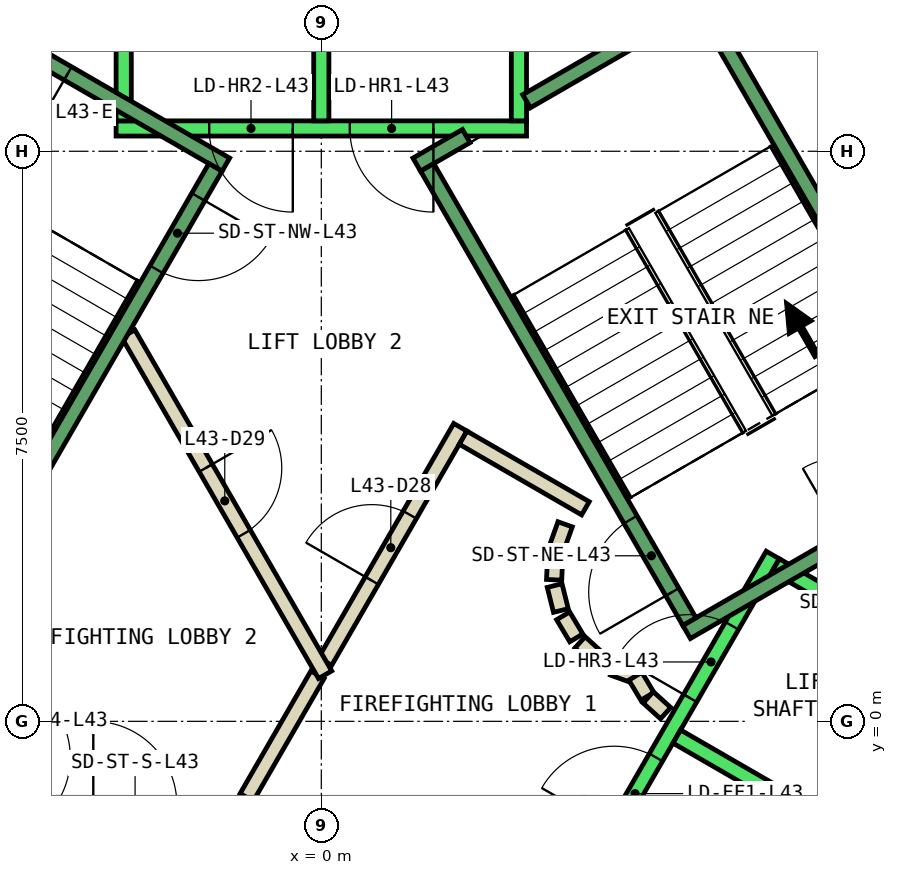
"""IFC4 building model, lengths in metres.
Left out: names, types, materials, properties, quantities, classifications, styles, units other than length and angle.
Written with IfcOpenShell. Run it as: python <this file> out.ifc"""

import sys

from ifc_helpers import new_model, si_unit, direction, frame, frame_2d, origin, place, context, subcontext, project, spatial, polyline, rectangle, outline, extrude, element, fill, save


model = new_model("IFC4")
c1 = context("Model", 3, precision=1e-05, world=origin(), true_north=direction((0.0, 1.0)))
c2 = subcontext(c1, "Body", "Model", "MODEL_VIEW")
j1 = project(units=[si_unit("LENGTHUNIT", "METRE"), si_unit("PLANEANGLEUNIT", "RADIAN")], contexts=[c1])
p1 = place(None, origin())
s1 = spatial("IfcSite", under=j1, at=p1, CompositionType="ELEMENT")
p2 = place(p1, origin())
s2 = spatial("IfcBuilding", under=s1, at=p2, CompositionType="ELEMENT")
p3 = place(p2, frame((0.0, 0.0, 194.0)))
s3 = spatial("IfcBuildingStorey", under=s2, at=p3, CompositionType="ELEMENT", Elevation=194.0)
p4 = place(p3, frame((0.0, 0.0, -0.4)))
e1 = element("IfcWall", 1, at=p4, inside=s3, PredefinedType="SHEAR", context=c2, shape_type="SweptSolid", body=[
    extrude(outline(polyline([(6.64, -9.0), (13.279, 2.5), (12.471, 2.5), (6.235, -8.3), (6.64, -9.0)])), origin(), (0.0, 0.0, 1.0), 4.2),
])
p5 = place(p3, frame((-0.982, -1.0, 0.0), z_axis=(0.0, 0.0, 1.0), x_axis=(0.50024047865, 0.865886518847, 0.0)))
e2 = element("IfcWall", 2, at=p5, inside=s3, PredefinedType="PARTITIONING", context=c2, shape_type="SweptSolid", body=[
    extrude(rectangle(XDim=1.863, YDim=0.2, at=frame_2d((0.931, 0.0))), origin(), (0.0, 0.0, 1.0), 3.8),
])
p6 = place(p3, frame((0.05, 0.787, 0.0), z_axis=(0.0, 0.0, 1.0), x_axis=(0.499954076797, 0.866051915934, 0.0)))
e3 = element("IfcWall", 3, at=p6, inside=s3, PredefinedType="PARTITIONING", context=c2, shape_type="SweptSolid", body=[
    extrude(rectangle(XDim=3.558, YDim=0.2, at=frame_2d((1.779, 0.0))), origin(), (0.0, 0.0, 1.0), 3.8),
])
p7 = place(p6, frame((1.229, 0.0, 0.0)))
e4 = element("IfcOpeningElement", 4, at=p7, cuts=e3, PredefinedType="OPENING", context=c2, shape_type="SweptSolid", body=[
    extrude(rectangle(XDim=1.0, YDim=2.1, at=frame_2d((0.5, 1.05))), frame((0.0, 0.11, 0.0), z_axis=(0.0, -1.0, 0.0), x_axis=(1.0, 0.0, 0.0)), (0.0, 0.0, 1.0), 0.22),
])
p8 = place(p3, frame((1.866, 3.732, 0.0), z_axis=(0.0, 0.0, 1.0), x_axis=(0.866043361281, -0.499968895414, 0.0)))
e5 = element("IfcWall", 5, at=p8, inside=s3, PredefinedType="PARTITIONING", context=c2, shape_type="SweptSolid", body=[
    extrude(rectangle(XDim=1.858, YDim=0.2, at=frame_2d((0.929, 0.0))), origin(), (0.0, 0.0, 1.0), 3.8),
])
p9 = place(p3, frame((3.208, 2.592, 0.0), z_axis=(0.0, 0.0, 1.0), x_axis=(-0.337388820924, -0.941365382578, 0.0)))
e6 = element("IfcWall", 6, at=p9, inside=s3, PredefinedType="PARTITIONING", context=c2, shape_type="SweptSolid", body=[
    extrude(rectangle(XDim=0.338, YDim=0.2, at=frame_2d((0.169, 0.0))), origin(), (0.0, 0.0, 1.0), 3.8),
])
p10 = place(p3, frame((3.079, 2.199, 0.0), z_axis=(0.0, 0.0, 1.0), x_axis=(-0.047771483479, -0.998858290933, 0.0)))
e7 = element("IfcWall", 7, at=p10, inside=s3, PredefinedType="PARTITIONING", context=c2, shape_type="SweptSolid", body=[
    extrude(rectangle(XDim=0.337, YDim=0.2, at=frame_2d((0.169, 0.0))), origin(), (0.0, 0.0, 1.0), 3.8),
])
p11 = place(p3, frame((3.07, 1.786, 0.0), z_axis=(0.0, 0.0, 1.0), x_axis=(0.242705583207, -0.970099994784, 0.0)))
e8 = element("IfcWall", 8, at=p11, inside=s3, PredefinedType="PARTITIONING", context=c2, shape_type="SweptSolid", body=[
    extrude(rectangle(XDim=0.338, YDim=0.2, at=frame_2d((0.169, 0.0))), origin(), (0.0, 0.0, 1.0), 3.8),
])
for number, where, z_axis, x_axis in (
    (9, (3.182, 1.388, 0.0), (0.0, 0.0, 1.0), (0.512, -0.859, 0.0)),
    (10, (3.404, 1.039, 0.0), (0.0, 0.0, 1.0), (0.74, -0.672, 0.0)),
):
    element("IfcWall", number, at=place(p3, frame(where, z_axis=z_axis, x_axis=x_axis)), inside=s3, PredefinedType="PARTITIONING", context=c2, shape_type="SweptSolid", body=[
        extrude(rectangle(XDim=0.338, YDim=0.2, at=frame_2d((0.169, 0.0))), origin(), (0.0, 0.0, 1.0), 3.8),
    ])
p12 = place(p3, frame((3.838, 0.702, 0.0), z_axis=(0.0, 0.0, 1.0), x_axis=(0.941035081519, -0.338308993895, 0.0)))
e11 = element("IfcWall", 11, at=p12, inside=s3, PredefinedType="PARTITIONING", context=c2, shape_type="SweptSolid", body=[
    extrude(rectangle(XDim=0.337, YDim=0.2, at=frame_2d((0.168, 0.0))), origin(), (0.0, 0.0, 1.0), 3.8),
])
p13 = place(p3, frame((4.132, 0.593, 0.0), z_axis=(0.0, 0.0, 1.0), x_axis=(0.513561617048, -0.858052717201, 0.0)))
e12 = element("IfcWall", 12, at=p13, inside=s3, PredefinedType="PARTITIONING", context=c2, shape_type="SweptSolid", body=[
    extrude(rectangle(XDim=0.308, YDim=0.2, at=frame_2d((0.154, 0.0))), origin(), (0.0, 0.0, 1.0), 3.8),
])
p14 = place(p3, frame((4.301, 0.315, 0.0), z_axis=(0.0, 0.0, 1.0), x_axis=(0.741798017506, -0.670623367639, 0.0)))
e13 = element("IfcWall", 13, at=p14, inside=s3, PredefinedType="PARTITIONING", context=c2, shape_type="SweptSolid", body=[
    extrude(rectangle(XDim=0.309, YDim=0.2, at=frame_2d((0.154, 0.0))), origin(), (0.0, 0.0, 1.0), 3.8),
])
p15 = place(p3, frame((-2.54, 5.1, 0.0), z_axis=(0.0, 0.0, 1.0), x_axis=(0.499925051871, -0.866068670783, 0.0)))
e14 = element("IfcWall", 14, at=p15, inside=s3, PredefinedType="PARTITIONING", context=c2, shape_type="SweptSolid", body=[
    extrude(rectangle(XDim=5.181, YDim=0.2, at=frame_2d((2.59, 0.0))), origin(), (0.0, 0.0, 1.0), 3.8),
])
p16 = place(p15, frame((2.04, 0.0, 0.0)))
e15 = element("IfcOpeningElement", 15, at=p16, cuts=e14, PredefinedType="OPENING", context=c2, shape_type="SweptSolid", body=[
    extrude(rectangle(XDim=1.0, YDim=2.1, at=frame_2d((0.5, 1.05))), frame((0.0, 0.11, 0.0), z_axis=(0.0, -1.0, 0.0), x_axis=(1.0, 0.0, 0.0)), (0.0, 0.0, 1.0), 0.22),
])
p17 = place(p3, frame((2.7, 7.8, 0.0), z_axis=(0.0, 0.0, 1.0), x_axis=(-1.0, 0.0, 0.0)))
e16 = element("IfcWall", 16, at=p17, inside=s3, PredefinedType="STANDARD", context=c2, shape_type="SweptSolid", body=[
    extrude(rectangle(XDim=5.4, YDim=0.2, at=frame_2d((2.7, 0.0))), origin(), (0.0, 0.0, 1.0), 3.8),
])
p18 = place(p17, frame((1.225, 0.0, 0.0)))
e17 = element("IfcOpeningElement", 17, at=p18, cuts=e16, PredefinedType="OPENING", context=c2, shape_type="SweptSolid", body=[
    extrude(rectangle(XDim=1.1, YDim=2.1, at=frame_2d((0.55, 1.05))), frame((0.0, 0.11, 0.0), z_axis=(0.0, -1.0, 0.0), x_axis=(1.0, 0.0, 0.0)), (0.0, 0.0, 1.0), 0.22),
])
p19 = place(p17, frame((3.075, 0.0, 0.0)))
e18 = element("IfcOpeningElement", 18, at=p19, cuts=e16, PredefinedType="OPENING", context=c2, shape_type="SweptSolid", body=[
    extrude(rectangle(XDim=1.1, YDim=2.1, at=frame_2d((0.55, 1.05))), frame((0.0, 0.11, 0.0), z_axis=(0.0, -1.0, 0.0), x_axis=(1.0, 0.0, 0.0)), (0.0, 0.0, 1.0), 0.22),
])
for number, where, z_axis, x_axis in (
    (19, (2.6, 7.9, 0.0), (0.0, 0.0, 1.0), (0.0, 1.0, 0.0)),
    (20, (0.0, 7.9, 0.0), (0.0, 0.0, 1.0), (0.0, 1.0, 0.0)),
    (21, (-2.6, 7.9, 0.0), (0.0, 0.0, 1.0), (0.0, 1.0, 0.0)),
):
    element("IfcWall", number, at=place(p3, frame(where, z_axis=z_axis, x_axis=x_axis)), inside=s3, PredefinedType="STANDARD", context=c2, shape_type="SweptSolid", body=[
        extrude(rectangle(XDim=2.4, YDim=0.2, at=frame_2d((1.2, 0.0))), origin(), (0.0, 0.0, 1.0), 3.8),
    ])
p20 = place(p3, frame((-5.94, 2.188, 0.0), z_axis=(0.0, 0.0, 1.0), x_axis=(0.500034260056, -0.866005622828, 0.0)))
e22 = element("IfcWall", 22, at=p20, inside=s3, PredefinedType="STANDARD", context=c2, shape_type="SweptSolid", body=[
    extrude(rectangle(XDim=5.399, YDim=0.2, at=frame_2d((2.7, 0.0))), origin(), (0.0, 0.0, 1.0), 3.8),
])
p21 = place(p20, frame((3.075, 0.0, 0.0)))
e23 = element("IfcOpeningElement", 23, at=p21, cuts=e22, PredefinedType="OPENING", context=c2, shape_type="SweptSolid", body=[
    extrude(rectangle(XDim=1.1, YDim=2.1, at=frame_2d((0.55, 1.05))), frame((0.0, 0.11, 0.0), z_axis=(0.0, -1.0, 0.0), x_axis=(1.0, 0.0, 0.0)), (0.0, 0.0, 1.0), 0.22),
])
p22 = place(p20, frame((1.225, 0.0, 0.0)))
e24 = element("IfcOpeningElement", 24, at=p22, cuts=e22, PredefinedType="OPENING", context=c2, shape_type="SweptSolid", body=[
    extrude(rectangle(XDim=1.1, YDim=2.1, at=frame_2d((0.55, 1.05))), frame((0.0, 0.11, 0.0), z_axis=(0.0, -1.0, 0.0), x_axis=(1.0, 0.0, 0.0)), (0.0, 0.0, 1.0), 0.22),
])
p23 = place(p3, frame((3.24, -2.488, 0.0), z_axis=(0.0, 0.0, 1.0), x_axis=(0.500034260056, 0.866005622828, 0.0)))
e25 = element("IfcWall", 25, at=p23, inside=s3, PredefinedType="STANDARD", context=c2, shape_type="SweptSolid", body=[
    extrude(rectangle(XDim=5.399, YDim=0.2, at=frame_2d((2.7, 0.0))), origin(), (0.0, 0.0, 1.0), 3.8),
])
p24 = place(p23, frame((3.225, 0.0, 0.0)))
e26 = element("IfcOpeningElement", 26, at=p24, cuts=e25, PredefinedType="OPENING", context=c2, shape_type="SweptSolid", body=[
    extrude(rectangle(XDim=1.1, YDim=2.1, at=frame_2d((0.55, 1.05))), frame((0.0, 0.11, 0.0), z_axis=(0.0, -1.0, 0.0), x_axis=(1.0, 0.0, 0.0)), (0.0, 0.0, 1.0), 0.22),
])
p25 = place(p23, frame((1.225, 0.0, 0.0)))
e27 = element("IfcOpeningElement", 27, at=p25, cuts=e25, PredefinedType="OPENING", context=c2, shape_type="SweptSolid", body=[
    extrude(rectangle(XDim=1.1, YDim=2.1, at=frame_2d((0.55, 1.05))), frame((0.0, 0.11, 0.0), z_axis=(0.0, -1.0, 0.0), x_axis=(1.0, 0.0, 0.0)), (0.0, 0.0, 1.0), 0.22),
])
p26 = place(p3, frame((5.492, -3.788, 0.0), z_axis=(0.0, 0.0, 1.0), x_axis=(0.500034260056, 0.866005622828, 0.0)))
e28 = element("IfcWall", 28, at=p26, inside=s3, PredefinedType="STANDARD", context=c2, shape_type="SweptSolid", body=[
    extrude(rectangle(XDim=5.399, YDim=0.2, at=frame_2d((2.7, 0.0))), origin(), (0.0, 0.0, 1.0), 3.8),
])
for number, where, z_axis, x_axis in (
    (29, (4.677, -0.2, 0.0), (0.0, 0.0, 1.0), (0.866, -0.5, 0.0)),
    (30, (5.977, 2.052, 0.0), (0.0, 0.0, 1.0), (0.866, -0.5, 0.0)),
):
    element("IfcWall", number, at=place(p3, frame(where, z_axis=z_axis, x_axis=x_axis)), inside=s3, PredefinedType="STANDARD", context=c2, shape_type="SweptSolid", body=[
        extrude(rectangle(XDim=2.399, YDim=0.2, at=frame_2d((1.2, 0.0))), origin(), (0.0, 0.0, 1.0), 3.8),
    ])
p27 = place(p3, frame((4.806, 1.176, 0.0), z_axis=(0.0, 0.0, 1.0), x_axis=(0.866059941101, 0.499940174841, 0.0)))
e31 = element("IfcWall", 31, at=p27, inside=s3, PredefinedType="STANDARD", context=c2, shape_type="SweptSolid", body=[
    extrude(rectangle(XDim=4.4, YDim=0.2, at=frame_2d((2.2, 0.0))), origin(), (0.0, 0.0, 1.0), 3.8),
])
p28 = place(p27, frame((2.4, 0.0, 0.0)))
e32 = element("IfcOpeningElement", 32, at=p28, cuts=e31, PredefinedType="OPENING", context=c2, shape_type="SweptSolid", body=[
    extrude(rectangle(XDim=1.1, YDim=2.2, at=frame_2d((0.55, 1.1))), frame((0.0, 0.11, 0.0), z_axis=(0.0, -1.0, 0.0), x_axis=(1.0, 0.0, 0.0)), (0.0, 0.0, 1.0), 0.22),
])
p29 = place(p3, frame((2.7, 8.158, 0.0), z_axis=(0.0, 0.0, 1.0), x_axis=(0.86611865017, 0.499838457731, 0.0)))
e33 = element("IfcWall", 33, at=p29, inside=s3, PredefinedType="STANDARD", context=c2, shape_type="SweptSolid", body=[
    extrude(rectangle(XDim=2.733, YDim=0.2, at=frame_2d((1.366, 0.0))), origin(), (0.0, 0.0, 1.0), 3.8),
])
p30 = place(p3, frame((1.256, 7.324, 0.0), z_axis=(0.0, 0.0, 1.0), x_axis=(0.865915093549, 0.500191014278, 0.0)))
e34 = element("IfcWall", 34, at=p30, inside=s3, PredefinedType="STANDARD", context=c2, shape_type="SweptSolid", body=[
    extrude(rectangle(XDim=0.752, YDim=0.2, at=frame_2d((0.376, 0.0))), origin(), (0.0, 0.0, 1.0), 3.8),
])
p31 = place(p3, frame((4.843, 1.312, 0.0), z_axis=(0.0, 0.0, 1.0), x_axis=(-0.499963383562, 0.866046543262, 0.0)))
e35 = element("IfcWall", 35, at=p31, inside=s3, PredefinedType="STANDARD", context=c2, shape_type="SweptSolid", body=[
    extrude(rectangle(XDim=6.9, YDim=0.2, at=frame_2d((3.45, 0.0))), origin(), (0.0, 0.0, 1.0), 3.8),
])
p32 = place(p31, frame((0.45, 0.0, 0.0)))
e36 = element("IfcOpeningElement", 36, at=p32, cuts=e35, PredefinedType="OPENING", context=c2, shape_type="SweptSolid", body=[
    extrude(rectangle(XDim=1.1, YDim=2.2, at=frame_2d((0.55, 1.1))), frame((0.0, 0.11, 0.0), z_axis=(0.0, -1.0, 0.0), x_axis=(1.0, 0.0, 0.0)), (0.0, 0.0, 1.0), 0.22),
])
p33 = place(p3, frame((8.48, 3.412, 0.0), z_axis=(0.0, 0.0, 1.0), x_axis=(-0.499978703459, 0.866037698999, 0.0)))
e37 = element("IfcWall", 37, at=p33, inside=s3, PredefinedType="STANDARD", context=c2, shape_type="SweptSolid", body=[
    extrude(rectangle(XDim=6.9, YDim=0.2, at=frame_2d((3.45, 0.0))), origin(), (0.0, 0.0, 1.0), 3.8),
])
p34 = place(p3, frame((-1.256, 7.324, 0.0), z_axis=(0.0, 0.0, 1.0), x_axis=(-0.866046073146, 0.499964197906, 0.0)))
e38 = element("IfcWall", 38, at=p34, inside=s3, PredefinedType="STANDARD", context=c2, shape_type="SweptSolid", body=[
    extrude(rectangle(XDim=4.4, YDim=0.2, at=frame_2d((2.2, 0.0))), origin(), (0.0, 0.0, 1.0), 3.8),
])
p35 = place(p34, frame((2.4, 0.0, 0.0)))
e39 = element("IfcOpeningElement", 39, at=p35, cuts=e38, PredefinedType="OPENING", context=c2, shape_type="SweptSolid", body=[
    extrude(rectangle(XDim=1.1, YDim=2.2, at=frame_2d((0.55, 1.1))), frame((0.0, 0.11, 0.0), z_axis=(0.0, -1.0, 0.0), x_axis=(1.0, 0.0, 0.0)), (0.0, 0.0, 1.0), 0.22),
])
p36 = place(p3, frame((-1.393, 7.288, 0.0), z_axis=(0.0, 0.0, 1.0), x_axis=(-0.499963383562, -0.866046543262, 0.0)))
e40 = element("IfcWall", 40, at=p36, inside=s3, PredefinedType="STANDARD", context=c2, shape_type="SweptSolid", body=[
    extrude(rectangle(XDim=6.9, YDim=0.2, at=frame_2d((3.45, 0.0))), origin(), (0.0, 0.0, 1.0), 3.8),
])
p37 = place(p36, frame((0.45, 0.0, 0.0)))
e41 = element("IfcOpeningElement", 41, at=p37, cuts=e40, PredefinedType="OPENING", context=c2, shape_type="SweptSolid", body=[
    extrude(rectangle(XDim=1.1, YDim=2.2, at=frame_2d((0.55, 1.1))), frame((0.0, 0.11, 0.0), z_axis=(0.0, -1.0, 0.0), x_axis=(1.0, 0.0, 0.0)), (0.0, 0.0, 1.0), 0.22),
])
p38 = place(p7, origin())
e42 = element("IfcDoor", 42, at=p38, inside=s3, OperationType="SINGLE_SWING_RIGHT", PredefinedType="DOOR", context=c2, shape_type="SweptSolid", body=[
    extrude(rectangle(XDim=1.0, YDim=2.1, at=frame_2d((0.5, 1.05))), frame((0.0, 0.025, 0.0), z_axis=(0.0, -1.0, 0.0), x_axis=(1.0, 0.0, 0.0)), (0.0, 0.0, 1.0), 0.05),
])
fill(e4, e42)
p39 = place(p16, origin())
e43 = element("IfcDoor", 43, at=p39, inside=s3, OperationType="SINGLE_SWING_RIGHT", PredefinedType="DOOR", context=c2, shape_type="SweptSolid", body=[
    extrude(rectangle(XDim=1.0, YDim=2.1, at=frame_2d((0.5, 1.05))), frame((0.0, 0.025, 0.0), z_axis=(0.0, -1.0, 0.0), x_axis=(1.0, 0.0, 0.0)), (0.0, 0.0, 1.0), 0.05),
])
fill(e15, e43)
p40 = place(p18, origin())
e44 = element("IfcDoor", 44, at=p40, inside=s3, OperationType="SLIDING_TO_LEFT", PredefinedType="DOOR", context=c2, shape_type="SweptSolid", body=[
    extrude(rectangle(XDim=1.1, YDim=2.1, at=frame_2d((0.55, 1.05))), frame((0.0, 0.025, 0.0), z_axis=(0.0, -1.0, 0.0), x_axis=(1.0, 0.0, 0.0)), (0.0, 0.0, 1.0), 0.05),
])
fill(e17, e44)
p41 = place(p19, origin())
e45 = element("IfcDoor", 45, at=p41, inside=s3, OperationType="SLIDING_TO_LEFT", PredefinedType="DOOR", context=c2, shape_type="SweptSolid", body=[
    extrude(rectangle(XDim=1.1, YDim=2.1, at=frame_2d((0.55, 1.05))), frame((0.0, 0.025, 0.0), z_axis=(0.0, -1.0, 0.0), x_axis=(1.0, 0.0, 0.0)), (0.0, 0.0, 1.0), 0.05),
])
fill(e18, e45)
p42 = place(p24, origin())
e46 = element("IfcDoor", 46, at=p42, inside=s3, OperationType="SLIDING_TO_LEFT", PredefinedType="DOOR", context=c2, shape_type="SweptSolid", body=[
    extrude(rectangle(XDim=1.1, YDim=2.1, at=frame_2d((0.55, 1.05))), frame((0.0, 0.025, 0.0), z_axis=(0.0, -1.0, 0.0), x_axis=(1.0, 0.0, 0.0)), (0.0, 0.0, 1.0), 0.05),
])
fill(e26, e46)
p43 = place(p25, origin())
e47 = element("IfcDoor", 47, at=p43, inside=s3, OperationType="SLIDING_TO_LEFT", PredefinedType="DOOR", context=c2, shape_type="SweptSolid", body=[
    extrude(rectangle(XDim=1.1, YDim=2.1, at=frame_2d((0.55, 1.05))), frame((0.0, 0.025, 0.0), z_axis=(0.0, -1.0, 0.0), x_axis=(1.0, 0.0, 0.0)), (0.0, 0.0, 1.0), 0.05),
])
fill(e27, e47)
p44 = place(p32, origin())
e48 = element("IfcDoor", 48, at=p44, inside=s3, OperationType="SINGLE_SWING_LEFT", PredefinedType="DOOR", context=c2, shape_type="SweptSolid", body=[
    extrude(rectangle(XDim=1.1, YDim=2.2, at=frame_2d((0.55, 1.1))), frame((0.0, 0.025, 0.0), z_axis=(0.0, -1.0, 0.0), x_axis=(1.0, 0.0, 0.0)), (0.0, 0.0, 1.0), 0.05),
])
fill(e36, e48)
p45 = place(p37, origin())
e49 = element("IfcDoor", 49, at=p45, inside=s3, OperationType="SINGLE_SWING_LEFT", PredefinedType="DOOR", context=c2, shape_type="SweptSolid", body=[
    extrude(rectangle(XDim=1.1, YDim=2.2, at=frame_2d((0.55, 1.1))), frame((0.0, 0.025, 0.0), z_axis=(0.0, -1.0, 0.0), x_axis=(1.0, 0.0, 0.0)), (0.0, 0.0, 1.0), 0.05),
])
fill(e41, e49)
p46 = place(p35, origin())
e50 = element("IfcDoor", 50, at=p46, inside=s3, OperationType="SINGLE_SWING_LEFT", PredefinedType="DOOR", context=c2, shape_type="SweptSolid", body=[
    extrude(rectangle(XDim=1.1, YDim=2.2, at=frame_2d((0.55, 1.1))), frame((0.0, 0.025, 0.0), z_axis=(0.0, -1.0, 0.0), x_axis=(1.0, 0.0, 0.0)), (0.0, 0.0, 1.0), 0.05),
])
fill(e39, e50)
save(model, sys.argv[1])
